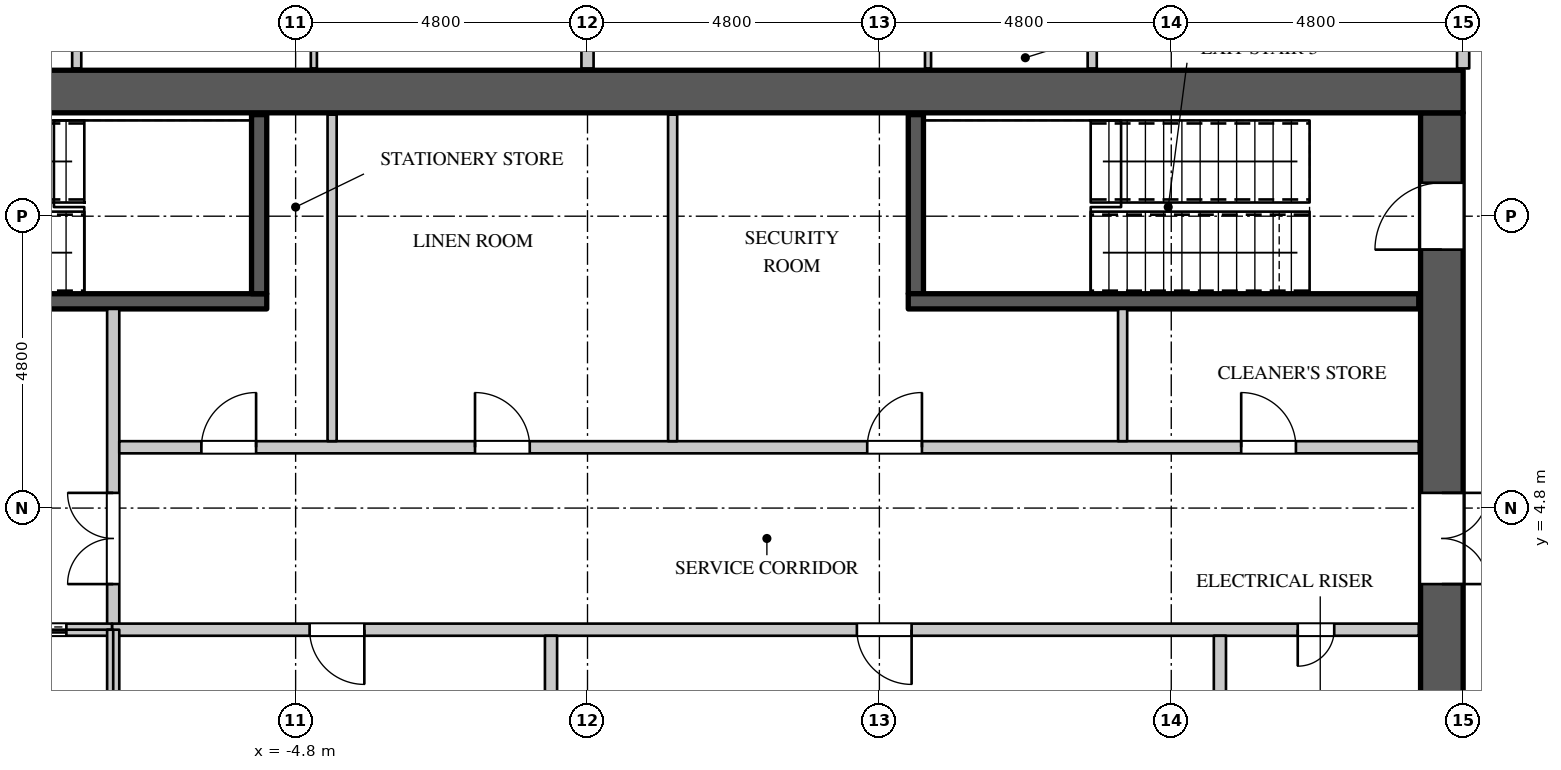
"""IFC4 building model, lengths in metres.
Left out: names, types, materials, properties, quantities, classifications, styles, units other than length and angle.
Written with IfcOpenShell. Run it as: python <this file> out.ifc"""

import sys

from ifc_helpers import new_model, si_unit, direction, frame, frame_2d, origin, place, context, subcontext, project, spatial, rectangle, extrude, element, fill, save


model = new_model("IFC4")
c1 = context("Model", 3, precision=1e-05, world=origin(), true_north=direction((0.0, 1.0)))
c2 = subcontext(c1, "Body", "Model", "MODEL_VIEW")
j1 = project(units=[si_unit("LENGTHUNIT", "METRE"), si_unit("PLANEANGLEUNIT", "RADIAN")], contexts=[c1])
p1 = place(None, origin())
s1 = spatial("IfcSite", under=j1, at=p1, CompositionType="ELEMENT")
p2 = place(p1, origin())
s2 = spatial("IfcBuilding", under=s1, at=p2, CompositionType="ELEMENT")
p3 = place(p2, frame((0.0, 0.0, 200.1)))
s3 = spatial("IfcBuildingStorey", under=s2, at=p3, CompositionType="ELEMENT", Elevation=200.1)
p4 = place(p3, frame((-14.4, 11.65, 0.0), z_axis=(0.0, 0.0, 1.0), x_axis=(1.0, 0.0, 0.0)))
e1 = element("IfcWall", 1, at=p4, inside=s3, PredefinedType="SHEAR", context=c2, shape_type="SweptSolid", body=[
    extrude(rectangle(XDim=28.8, YDim=0.7, at=frame_2d((14.4, 0.0))), origin(), (0.0, 0.0, 1.0), 4.2),
])
p5 = place(p3, frame((14.05, -11.3, 0.0), z_axis=(0.0, 0.0, 1.0), x_axis=(0.0, 1.0, 0.0)))
e2 = element("IfcWall", 2, at=p5, inside=s3, PredefinedType="SHEAR", context=c2, shape_type="SweptSolid", body=[
    extrude(rectangle(XDim=22.6, YDim=0.7, at=frame_2d((11.3, 0.0))), origin(), (0.0, 0.0, 1.0), 4.2),
])
p6 = place(p5, frame((20.35, 0.0, 0.0)))
e3 = element("IfcOpeningElement", 3, at=p6, cuts=e2, PredefinedType="OPENING", context=c2, shape_type="SweptSolid", body=[
    extrude(rectangle(XDim=1.1, YDim=2.2, at=frame_2d((0.55, 1.1))), frame((0.0, 0.36, 0.0), z_axis=(0.0, -1.0, 0.0), x_axis=(1.0, 0.0, 0.0)), (0.0, 0.0, 1.0), 0.72),
])
p7 = place(p5, frame((1.15, 0.0, 0.0)))
e4 = element("IfcOpeningElement", 4, at=p7, cuts=e2, PredefinedType="OPENING", context=c2, shape_type="SweptSolid", body=[
    extrude(rectangle(XDim=1.1, YDim=2.2, at=frame_2d((0.55, 1.1))), frame((0.0, 0.36, 0.0), z_axis=(0.0, -1.0, 0.0), x_axis=(1.0, 0.0, 0.0)), (0.0, 0.0, 1.0), 0.72),
])
p8 = place(p5, frame((14.85, 0.0, 0.0)))
e5 = element("IfcOpeningElement", 5, at=p8, cuts=e2, PredefinedType="OPENING", context=c2, shape_type="SweptSolid", body=[
    extrude(rectangle(XDim=1.5, YDim=2.4, at=frame_2d((0.75, 1.2))), frame((0.0, 0.36, 0.0), z_axis=(0.0, -1.0, 0.0), x_axis=(1.0, 0.0, 0.0)), (0.0, 0.0, 1.0), 0.72),
])
p9 = place(p5, frame((6.25, 0.0, 0.0)))
e6 = element("IfcOpeningElement", 6, at=p9, cuts=e2, PredefinedType="OPENING", context=c2, shape_type="SweptSolid", body=[
    extrude(rectangle(XDim=1.5, YDim=2.4, at=frame_2d((0.75, 1.2))), frame((0.0, 0.36, 0.0), z_axis=(0.0, -1.0, 0.0), x_axis=(1.0, 0.0, 0.0)), (0.0, 0.0, 1.0), 0.72),
])
p10 = place(p3, frame((-7.8, 2.8, 0.0), z_axis=(0.0, 0.0, 1.0), x_axis=(0.0, 1.0, 0.0)))
e7 = element("IfcWall", 7, at=p10, inside=s3, PredefinedType="PARTITIONING", context=c2, shape_type="SweptSolid", body=[
    extrude(rectangle(XDim=5.275, YDim=0.2, at=frame_2d((2.637, 0.0))), origin(), (0.0, 0.0, 1.0), 3.798),
])
p11 = place(p10, frame((0.75, 0.0, 0.0)))
e8 = element("IfcOpeningElement", 8, at=p11, cuts=e7, PredefinedType="OPENING", context=c2, shape_type="SweptSolid", body=[
    extrude(rectangle(XDim=1.5, YDim=2.4, at=frame_2d((0.75, 1.2))), frame((0.0, 0.11, 0.0), z_axis=(0.0, -1.0, 0.0), x_axis=(1.0, 0.0, 0.0)), (0.0, 0.0, 1.0), 0.22),
])
p12 = place(p3, frame((-7.7, 5.8, 0.0), z_axis=(0.0, 0.0, 1.0), x_axis=(1.0, 0.0, 0.0)))
e9 = element("IfcWall", 9, at=p12, inside=s3, PredefinedType="PARTITIONING", context=c2, shape_type="SweptSolid", body=[
    extrude(rectangle(XDim=21.37, YDim=0.2, at=frame_2d((10.685, 0.0))), origin(), (0.0, 0.0, 1.0), 3.798),
])
p13 = place(p12, frame((1.35, 0.0, 0.0)))
e10 = element("IfcOpeningElement", 10, at=p13, cuts=e9, PredefinedType="OPENING", context=c2, shape_type="SweptSolid", body=[
    extrude(rectangle(XDim=0.9, YDim=2.2, at=frame_2d((0.45, 1.1))), frame((0.0, 0.11, 0.0), z_axis=(0.0, -1.0, 0.0), x_axis=(1.0, 0.0, 0.0)), (0.0, 0.0, 1.0), 0.22),
])
p14 = place(p12, frame((5.85, 0.0, 0.0)))
e11 = element("IfcOpeningElement", 11, at=p14, cuts=e9, PredefinedType="OPENING", context=c2, shape_type="SweptSolid", body=[
    extrude(rectangle(XDim=0.9, YDim=2.2, at=frame_2d((0.45, 1.1))), frame((0.0, 0.11, 0.0), z_axis=(0.0, -1.0, 0.0), x_axis=(1.0, 0.0, 0.0)), (0.0, 0.0, 1.0), 0.22),
])
p15 = place(p12, frame((12.3, 0.0, 0.0)))
e12 = element("IfcOpeningElement", 12, at=p15, cuts=e9, PredefinedType="OPENING", context=c2, shape_type="SweptSolid", body=[
    extrude(rectangle(XDim=0.9, YDim=2.2, at=frame_2d((0.45, 1.1))), frame((0.0, 0.11, 0.0), z_axis=(0.0, -1.0, 0.0), x_axis=(1.0, 0.0, 0.0)), (0.0, 0.0, 1.0), 0.22),
])
p16 = place(p12, frame((18.45, 0.0, 0.0)))
e13 = element("IfcOpeningElement", 13, at=p16, cuts=e9, PredefinedType="OPENING", context=c2, shape_type="SweptSolid", body=[
    extrude(rectangle(XDim=0.9, YDim=2.2, at=frame_2d((0.45, 1.1))), frame((0.0, 0.11, 0.0), z_axis=(0.0, -1.0, 0.0), x_axis=(1.0, 0.0, 0.0)), (0.0, 0.0, 1.0), 0.22),
])
p17 = place(p3, frame((14.4, 12.03, 0.0), z_axis=(0.0, 0.0, 1.0), x_axis=(0.0, 1.0, 0.0)))
e14 = element("IfcWall", 14, at=p17, inside=s3, PredefinedType="PARTITIONING", context=c2, shape_type="SweptSolid", body=[
    extrude(rectangle(XDim=2.27, YDim=0.2, at=frame_2d((1.135, 0.0))), origin(), (0.0, 0.0, 1.0), 3.798),
])
p18 = place(p17, frame((0.55, 0.0, 0.0)))
e15 = element("IfcOpeningElement", 15, at=p18, cuts=e14, PredefinedType="OPENING", context=c2, shape_type="SweptSolid", body=[
    extrude(rectangle(XDim=1.1, YDim=2.4, at=frame_2d((0.55, 1.2))), frame((0.0, 0.11, 0.0), z_axis=(0.0, -1.0, 0.0), x_axis=(1.0, 0.0, 0.0)), (0.0, 0.0, 1.0), 0.22),
])
p19 = place(p3, frame((-8.4, 12.03, 0.0), z_axis=(0.0, 0.0, 1.0), x_axis=(0.0, 1.0, 0.0)))
e16 = element("IfcWall", 16, at=p19, inside=s3, PredefinedType="PARTITIONING", context=c2, shape_type="SweptSolid", body=[
    extrude(rectangle(XDim=4.245, YDim=0.15, at=frame_2d((2.123, 0.0))), origin(), (0.0, 0.0, 1.0), 3.798),
])
for number, where, z_axis, x_axis in (
    (17, (-4.2, 5.9, 0.0), (0.0, 0.0, 1.0), (0.0, 1.0, 0.0)),
    (18, (1.4, 5.9, 0.0), (0.0, 0.0, 1.0), (0.0, 1.0, 0.0)),
):
    element("IfcWall", number, at=place(p3, frame(where, z_axis=z_axis, x_axis=x_axis)), inside=s3, PredefinedType="PARTITIONING", context=c2, shape_type="SweptSolid", body=[
        extrude(rectangle(XDim=5.37, YDim=0.15, at=frame_2d((2.685, 0.0))), origin(), (0.0, 0.0, 1.0), 3.798),
    ])
p20 = place(p3, frame((8.3, 12.03, 0.0), z_axis=(0.0, 0.0, 1.0), x_axis=(0.0, 1.0, 0.0)))
e19 = element("IfcWall", 19, at=p20, inside=s3, PredefinedType="PARTITIONING", context=c2, shape_type="SweptSolid", body=[
    extrude(rectangle(XDim=3.445, YDim=0.15, at=frame_2d((1.723, 0.0))), origin(), (0.0, 0.0, 1.0), 3.798),
])
p21 = place(p20, frame((1.2, 0.0, 0.0)))
e20 = element("IfcOpeningElement", 20, at=p21, cuts=e19, PredefinedType="OPENING", context=c2, shape_type="SweptSolid", body=[
    extrude(rectangle(XDim=0.95, YDim=2.2, at=frame_2d((0.475, 1.1))), frame((0.0, 0.085, 0.0), z_axis=(0.0, -1.0, 0.0), x_axis=(1.0, 0.0, 0.0)), (0.0, 0.0, 1.0), 0.17),
])
p22 = place(p3, frame((8.8, 5.9, 0.0), z_axis=(0.0, 0.0, 1.0), x_axis=(0.0, 1.0, 0.0)))
e21 = element("IfcWall", 21, at=p22, inside=s3, PredefinedType="PARTITIONING", context=c2, shape_type="SweptSolid", body=[
    extrude(rectangle(XDim=2.175, YDim=0.15, at=frame_2d((1.087, 0.0))), origin(), (0.0, 0.0, 1.0), 3.798),
])
p23 = place(p3, frame((0.0, 12.03, 0.0), z_axis=(0.0, 0.0, 1.0), x_axis=(0.0, 1.0, 0.0)))
e22 = element("IfcWall", 22, at=p23, inside=s3, PredefinedType="PARTITIONING", context=c2, shape_type="SweptSolid", body=[
    extrude(rectangle(XDim=11.995, YDim=0.2, at=frame_2d((5.998, 0.0))), origin(), (0.0, 0.0, 1.0), 3.798),
])
p24 = place(p3, frame((-7.82, 2.8, 0.0), z_axis=(0.0, 0.0, 1.0), x_axis=(1.0, 0.0, 0.0)))
e23 = element("IfcWall", 23, at=p24, inside=s3, PredefinedType="PARTITIONING", context=c2, shape_type="SweptSolid", body=[
    extrude(rectangle(XDim=21.49, YDim=0.2, at=frame_2d((10.745, 0.0))), origin(), (0.0, 0.0, 1.0), 3.798),
])
p25 = place(p24, frame((19.5, 0.0, 0.0)))
e24 = element("IfcOpeningElement", 24, at=p25, cuts=e23, PredefinedType="OPENING", context=c2, shape_type="SweptSolid", body=[
    extrude(rectangle(XDim=0.6, YDim=2.0, at=frame_2d((0.3, 1.0))), frame((0.0, 0.11, 0.0), z_axis=(0.0, -1.0, 0.0), x_axis=(1.0, 0.0, 0.0)), (0.0, 0.0, 1.0), 0.22),
])
p26 = place(p24, frame((3.25, 0.0, 0.0)))
e25 = element("IfcOpeningElement", 25, at=p26, cuts=e23, PredefinedType="OPENING", context=c2, shape_type="SweptSolid", body=[
    extrude(rectangle(XDim=0.9, YDim=2.2, at=frame_2d((0.45, 1.1))), frame((0.0, 0.11, 0.0), z_axis=(0.0, -1.0, 0.0), x_axis=(1.0, 0.0, 0.0)), (0.0, 0.0, 1.0), 0.22),
])
p27 = place(p24, frame((12.25, 0.0, 0.0)))
e26 = element("IfcOpeningElement", 26, at=p27, cuts=e23, PredefinedType="OPENING", context=c2, shape_type="SweptSolid", body=[
    extrude(rectangle(XDim=0.9, YDim=2.2, at=frame_2d((0.45, 1.1))), frame((0.0, 0.11, 0.0), z_axis=(0.0, -1.0, 0.0), x_axis=(1.0, 0.0, 0.0)), (0.0, 0.0, 1.0), 0.22),
])
for number, where, z_axis, x_axis in (
    (27, (-0.6, 0.1, 0.0), (0.0, 0.0, 1.0), (0.0, 1.0, 0.0)),
    (28, (10.4, 0.1, 0.0), (0.0, 0.0, 1.0), (0.0, 1.0, 0.0)),
):
    element("IfcWall", number, at=place(p3, frame(where, z_axis=z_axis, x_axis=x_axis)), inside=s3, PredefinedType="PARTITIONING", context=c2, shape_type="SweptSolid", body=[
        extrude(rectangle(XDim=2.6, YDim=0.2, at=frame_2d((1.3, 0.0))), origin(), (0.0, 0.0, 1.0), 3.798),
    ])
p28 = place(p3, frame((-13.67, 2.8, 0.0), z_axis=(0.0, 0.0, 1.0), x_axis=(1.0, 0.0, 0.0)))
e29 = element("IfcWall", 29, at=p28, inside=s3, PredefinedType="PARTITIONING", context=c2, shape_type="SweptSolid", body=[
    extrude(rectangle(XDim=5.85, YDim=0.2, at=frame_2d((2.925, 0.0))), origin(), (0.0, 0.0, 1.0), 3.798),
])
p29 = place(p28, frame((1.05, 0.0, 0.0)))
e30 = element("IfcOpeningElement", 30, at=p29, cuts=e29, PredefinedType="OPENING", context=c2, shape_type="SweptSolid", body=[
    extrude(rectangle(XDim=1.1, YDim=2.2, at=frame_2d((0.55, 1.1))), frame((0.0, 0.11, 0.0), z_axis=(0.0, -1.0, 0.0), x_axis=(1.0, 0.0, 0.0)), (0.0, 0.0, 1.0), 0.22),
])
p30 = place(p28, frame((4.0, 0.0, 0.0)))
e31 = element("IfcOpeningElement", 31, at=p30, cuts=e29, PredefinedType="OPENING", context=c2, shape_type="SweptSolid", body=[
    extrude(rectangle(XDim=1.1, YDim=2.2, at=frame_2d((0.55, 1.1))), frame((0.0, 0.11, 0.0), z_axis=(0.0, -1.0, 0.0), x_axis=(1.0, 0.0, 0.0)), (0.0, 0.0, 1.0), 0.22),
])
p31 = place(p3, frame((-7.8, 0.0, 0.0), z_axis=(0.0, 0.0, 1.0), x_axis=(0.0, 1.0, 0.0)))
e32 = element("IfcWall", 32, at=p31, inside=s3, PredefinedType="PARTITIONING", context=c2, shape_type="SweptSolid", body=[
    extrude(rectangle(XDim=2.8, YDim=0.2, at=frame_2d((1.4, 0.0))), origin(), (0.0, 0.0, 1.0), 3.798),
])
p32 = place(p3, frame((-13.67, 8.2, 0.0), z_axis=(0.0, 0.0, 1.0), x_axis=(1.0, 0.0, 0.0)))
e33 = element("IfcWall", 33, at=p32, inside=s3, PredefinedType="SHEAR", context=c2, shape_type="SweptSolid", body=[
    extrude(rectangle(XDim=8.395, YDim=0.25, at=frame_2d((4.198, 0.0))), origin(), (0.0, 0.0, 1.0), 3.798),
])
p33 = place(p32, frame((0.15, 0.0, 0.0)))
e34 = element("IfcOpeningElement", 34, at=p33, cuts=e33, PredefinedType="OPENING", context=c2, shape_type="SweptSolid", body=[
    extrude(rectangle(XDim=1.1, YDim=2.2, at=frame_2d((0.55, 1.1))), frame((0.0, 0.135, 0.0), z_axis=(0.0, -1.0, 0.0), x_axis=(1.0, 0.0, 0.0)), (0.0, 0.0, 1.0), 0.27),
])
for number, where, z_axis, x_axis in (
    (35, (-5.4, 8.325, 0.0), (0.0, 0.0, 1.0), (0.0, 1.0, 0.0)),
    (36, (5.4, 8.325, 0.0), (0.0, 0.0, 1.0), (0.0, 1.0, 0.0)),
):
    element("IfcWall", number, at=place(p3, frame(where, z_axis=z_axis, x_axis=x_axis)), inside=s3, PredefinedType="SHEAR", context=c2, shape_type="SweptSolid", body=[
        extrude(rectangle(XDim=2.945, YDim=0.25, at=frame_2d((1.473, 0.0))), origin(), (0.0, 0.0, 1.0), 3.798),
    ])
p34 = place(p3, frame((5.275, 8.2, 0.0), z_axis=(0.0, 0.0, 1.0), x_axis=(1.0, 0.0, 0.0)))
e37 = element("IfcWall", 37, at=p34, inside=s3, PredefinedType="SHEAR", context=c2, shape_type="SweptSolid", body=[
    extrude(rectangle(XDim=8.395, YDim=0.25, at=frame_2d((4.198, 0.0))), origin(), (0.0, 0.0, 1.0), 3.798),
])
p35 = place(p3, frame((-4.5, 12.03, 0.0), z_axis=(0.0, 0.0, 1.0), x_axis=(0.0, 1.0, 0.0)))
e38 = element("IfcWall", 38, at=p35, inside=s3, PredefinedType="PARTITIONING", context=c2, shape_type="SweptSolid", body=[
    extrude(rectangle(XDim=4.695, YDim=0.1, at=frame_2d((2.348, 0.0))), origin(), (0.0, 0.0, 1.0), 3.798),
])
p36 = place(p3, frame((5.6, 12.03, 0.0), z_axis=(0.0, 0.0, 1.0), x_axis=(0.0, 1.0, 0.0)))
e39 = element("IfcWall", 39, at=p36, inside=s3, PredefinedType="PARTITIONING", context=c2, shape_type="SweptSolid", body=[
    extrude(rectangle(XDim=4.395, YDim=0.1, at=frame_2d((2.198, 0.0))), origin(), (0.0, 0.0, 1.0), 3.798),
])
p37 = place(p25, origin())
e40 = element("IfcDoor", 40, at=p37, inside=s3, OperationType="SINGLE_SWING_RIGHT", PredefinedType="DOOR", context=c2, shape_type="SweptSolid", body=[
    extrude(rectangle(XDim=0.6, YDim=2.0, at=frame_2d((0.3, 1.0))), frame((0.0, 0.025, 0.0), z_axis=(0.0, -1.0, 0.0), x_axis=(1.0, 0.0, 0.0)), (0.0, 0.0, 1.0), 0.05),
])
fill(e24, e40)
p38 = place(p13, origin())
e41 = element("IfcDoor", 41, at=p38, inside=s3, OperationType="SINGLE_SWING_RIGHT", PredefinedType="DOOR", context=c2, shape_type="SweptSolid", body=[
    extrude(rectangle(XDim=0.9, YDim=2.2, at=frame_2d((0.45, 1.1))), frame((0.0, 0.025, 0.0), z_axis=(0.0, -1.0, 0.0), x_axis=(1.0, 0.0, 0.0)), (0.0, 0.0, 1.0), 0.05),
])
fill(e10, e41)
p39 = place(p14, origin())
e42 = element("IfcDoor", 42, at=p39, inside=s3, OperationType="SINGLE_SWING_LEFT", PredefinedType="DOOR", context=c2, shape_type="SweptSolid", body=[
    extrude(rectangle(XDim=0.9, YDim=2.2, at=frame_2d((0.45, 1.1))), frame((0.0, 0.025, 0.0), z_axis=(0.0, -1.0, 0.0), x_axis=(1.0, 0.0, 0.0)), (0.0, 0.0, 1.0), 0.05),
])
fill(e11, e42)
p40 = place(p15, origin())
e43 = element("IfcDoor", 43, at=p40, inside=s3, OperationType="SINGLE_SWING_RIGHT", PredefinedType="DOOR", context=c2, shape_type="SweptSolid", body=[
    extrude(rectangle(XDim=0.9, YDim=2.2, at=frame_2d((0.45, 1.1))), frame((0.0, 0.025, 0.0), z_axis=(0.0, -1.0, 0.0), x_axis=(1.0, 0.0, 0.0)), (0.0, 0.0, 1.0), 0.05),
])
fill(e12, e43)
p41 = place(p16, origin())
e44 = element("IfcDoor", 44, at=p41, inside=s3, OperationType="SINGLE_SWING_LEFT", PredefinedType="DOOR", context=c2, shape_type="SweptSolid", body=[
    extrude(rectangle(XDim=0.9, YDim=2.2, at=frame_2d((0.45, 1.1))), frame((0.0, 0.025, 0.0), z_axis=(0.0, -1.0, 0.0), x_axis=(1.0, 0.0, 0.0)), (0.0, 0.0, 1.0), 0.05),
])
fill(e13, e44)
p42 = place(p26, origin())
e45 = element("IfcDoor", 45, at=p42, inside=s3, OperationType="SINGLE_SWING_LEFT", PredefinedType="DOOR", context=c2, shape_type="SweptSolid", body=[
    extrude(rectangle(XDim=0.9, YDim=2.2, at=frame_2d((0.45, 1.1))), frame((0.0, 0.025, 0.0), z_axis=(0.0, -1.0, 0.0), x_axis=(1.0, 0.0, 0.0)), (0.0, 0.0, 1.0), 0.05),
])
fill(e25, e45)
p43 = place(p27, origin())
e46 = element("IfcDoor", 46, at=p43, inside=s3, OperationType="SINGLE_SWING_LEFT", PredefinedType="DOOR", context=c2, shape_type="SweptSolid", body=[
    extrude(rectangle(XDim=0.9, YDim=2.2, at=frame_2d((0.45, 1.1))), frame((0.0, 0.025, 0.0), z_axis=(0.0, -1.0, 0.0), x_axis=(1.0, 0.0, 0.0)), (0.0, 0.0, 1.0), 0.05),
])
fill(e26, e46)
p44 = place(p30, origin())
e47 = element("IfcDoor", 47, at=p44, inside=s3, OperationType="DOUBLE_DOOR_SLIDING", PredefinedType="DOOR", context=c2, shape_type="SweptSolid", body=[
    extrude(rectangle(XDim=1.1, YDim=2.2, at=frame_2d((0.55, 1.1))), frame((0.0, 0.025, 0.0), z_axis=(0.0, -1.0, 0.0), x_axis=(1.0, 0.0, 0.0)), (0.0, 0.0, 1.0), 0.05),
])
fill(e31, e47)
p45 = place(p11, origin())
e48 = element("IfcDoor", 48, at=p45, inside=s3, OperationType="DOUBLE_DOOR_SINGLE_SWING", PredefinedType="DOOR", context=c2, shape_type="SweptSolid", body=[
    extrude(rectangle(XDim=1.5, YDim=2.4, at=frame_2d((0.75, 1.2))), frame((0.0, 0.025, 0.0), z_axis=(0.0, -1.0, 0.0), x_axis=(1.0, 0.0, 0.0)), (0.0, 0.0, 1.0), 0.05),
])
fill(e8, e48)
p46 = place(p6, origin())
e49 = element("IfcDoor", 49, at=p46, inside=s3, OperationType="SINGLE_SWING_LEFT", PredefinedType="DOOR", context=c2, shape_type="SweptSolid", body=[
    extrude(rectangle(XDim=1.1, YDim=2.2, at=frame_2d((0.55, 1.1))), frame((0.0, 0.345, 0.0), z_axis=(0.0, -1.0, 0.0), x_axis=(1.0, 0.0, 0.0)), (0.0, 0.0, 1.0), 0.05),
])
fill(e3, e49)
p47 = place(p8, origin())
e50 = element("IfcDoor", 50, at=p47, inside=s3, OperationType="DOUBLE_DOOR_SINGLE_SWING", PredefinedType="DOOR", context=c2, shape_type="SweptSolid", body=[
    extrude(rectangle(XDim=1.5, YDim=2.4, at=frame_2d((0.75, 1.2))), frame((0.0, -0.295, 0.0), z_axis=(0.0, -1.0, 0.0), x_axis=(1.0, 0.0, 0.0)), (0.0, 0.0, 1.0), 0.05),
])
fill(e5, e50)
save(model, sys.argv[1])
